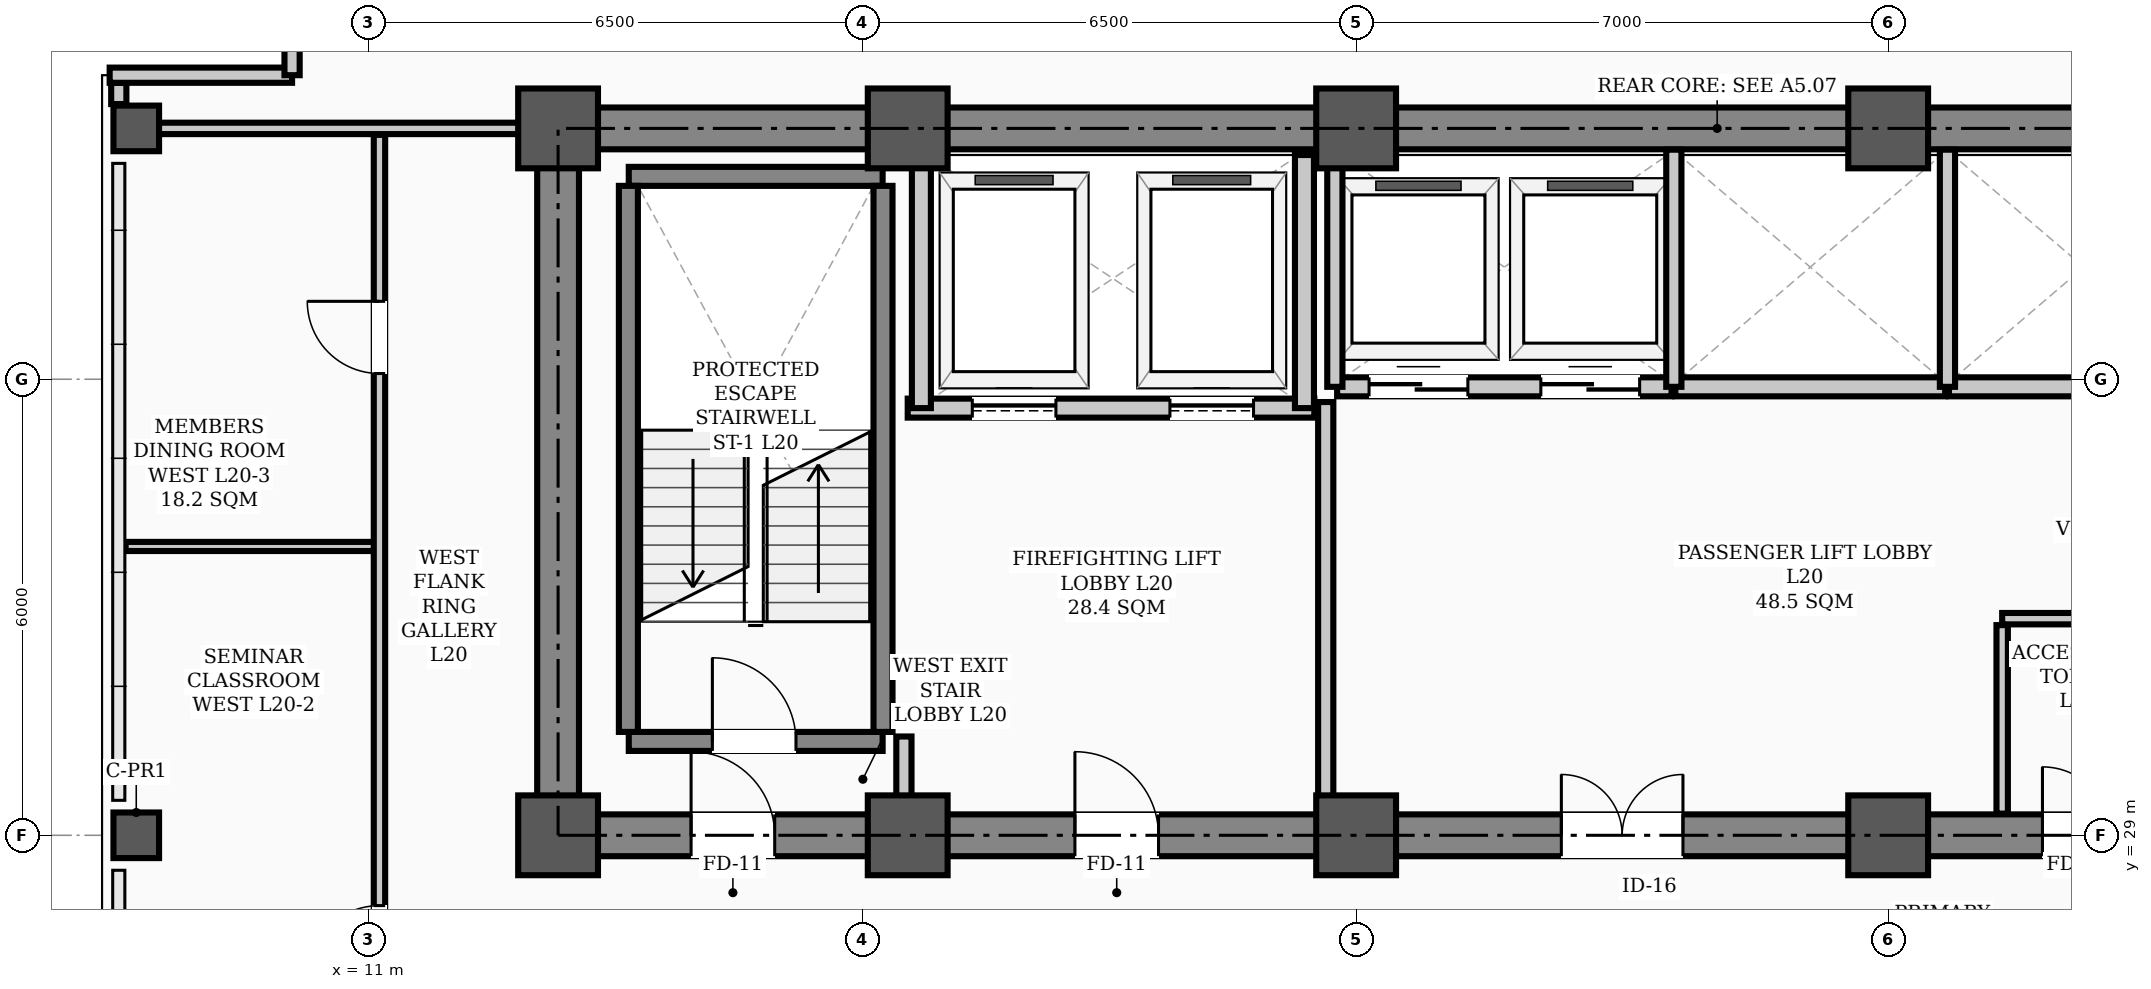
"""IFC4 building model, lengths in metres.
Left out: names, types, materials, properties, quantities, classifications, styles, units other than length and angle.
Written with IfcOpenShell. Run it as: python <this file> out.ifc"""

import sys

from ifc_helpers import new_model, si_unit, direction, frame, frame_2d, origin, origin_2d, place, context, subcontext, project, spatial, rectangle, hollow_rectangle, extrude, element, fill, save


model = new_model("IFC4")
c1 = context("Model", 3, precision=1e-05, world=origin(), true_north=direction((0.0, 1.0)))
c2 = subcontext(c1, "Body", "Model", "MODEL_VIEW")
j1 = project(units=[si_unit("LENGTHUNIT", "METRE"), si_unit("PLANEANGLEUNIT", "RADIAN")], contexts=[c1])
p1 = place(None, origin())
s1 = spatial("IfcSite", under=j1, at=p1, CompositionType="ELEMENT")
p2 = place(p1, origin())
s2 = spatial("IfcBuilding", under=s1, at=p2, CompositionType="ELEMENT")
p3 = place(p2, frame((0.0, 0.0, 81.1)))
s3 = spatial("IfcBuildingStorey", under=s2, at=p3, CompositionType="ELEMENT", Elevation=81.1)
for number, where, z_axis, x_axis in (
    (1, (13.5, 29.0, 0.0), (0.0, 0.0, 1.0), (1.0, 0.0, 0.0)),
    (2, (13.5, 38.3, 0.0), (0.0, 0.0, 1.0), (1.0, 0.0, 0.0)),
    (3, (18.1, 29.0, 0.0), (0.0, 0.0, 1.0), (1.0, 0.0, 0.0)),
    (4, (18.1, 38.3, 0.0), (0.0, 0.0, 1.0), (1.0, 0.0, 0.0)),
    (5, (24.0, 29.0, 0.0), (0.0, 0.0, 1.0), (1.0, 0.0, 0.0)),
    (6, (24.0, 38.3, 0.0), (0.0, 0.0, 1.0), (1.0, 0.0, 0.0)),
    (7, (31.0, 29.0, 0.0), (0.0, 0.0, 1.0), (1.0, 0.0, 0.0)),
    (8, (31.0, 38.3, 0.0), (0.0, 0.0, 1.0), (1.0, 0.0, 0.0)),
):
    element("IfcColumn", number, at=place(p3, frame(where, z_axis=z_axis, x_axis=x_axis)), inside=s3, PredefinedType="COLUMN", context=c2, shape_type="SweptSolid", body=[
        extrude(hollow_rectangle(XDim=1.05, YDim=1.05, WallThickness=0.038, InnerFilletRadius=0.019, OuterFilletRadius=0.057, at=origin_2d()), origin(), (0.0, 0.0, 1.0), 3.9),
    ])
for number, where, z_axis, x_axis in (
    (9, (7.95, 29.0, 0.0), (0.0, 0.0, 1.0), (1.0, 0.0, 0.0)),
    (10, (7.95, 38.3, 0.0), (0.0, 0.0, 1.0), (1.0, 0.0, 0.0)),
):
    element("IfcColumn", number, at=place(p3, frame(where, z_axis=z_axis, x_axis=x_axis)), inside=s3, PredefinedType="COLUMN", context=c2, shape_type="SweptSolid", body=[
        extrude(hollow_rectangle(XDim=0.6, YDim=0.6, WallThickness=0.026, InnerFilletRadius=0.013, OuterFilletRadius=0.039, at=origin_2d()), origin(), (0.0, 0.0, 1.0), 3.9),
    ])
p4 = place(p3, frame((7.72, 38.62, 0.0), z_axis=(0.0, 0.0, 1.0), x_axis=(0.0, 1.0, 0.0)))
e11 = element("IfcWall", 11, at=p4, inside=s3, PredefinedType="PARAPET", context=c2, shape_type="SweptSolid", body=[
    extrude(rectangle(XDim=0.28, YDim=0.2, at=frame_2d((0.14, 0.0))), origin(), (0.0, 0.0, 1.0), 1.2),
])
for number, where, z_axis, x_axis in (
    (12, (7.6, 39.0, 0.0), (0.0, 0.0, 1.0), (1.0, 0.0, 0.0)),
    (13, (10.0, 39.0, 0.0), (0.0, 0.0, 1.0), (0.0, 1.0, 0.0)),
):
    element("IfcWall", number, at=place(p3, frame(where, z_axis=z_axis, x_axis=x_axis)), inside=s3, PredefinedType="PARAPET", context=c2, shape_type="SweptSolid", body=[
        extrude(rectangle(XDim=2.4, YDim=0.2, at=frame_2d((1.2, 0.0))), origin(), (0.0, 0.0, 1.0), 1.2),
    ])
p5 = place(p3, frame((13.5, 29.0, 0.0), z_axis=(0.0, 0.0, 1.0), x_axis=(1.0, 0.0, 0.0)))
e14 = element("IfcWall", 14, at=p5, inside=s3, PredefinedType="SHEAR", context=c2, shape_type="SweptSolid", body=[
    extrude(rectangle(XDim=30.5, YDim=0.55, at=frame_2d((15.25, 0.0))), origin(), (0.0, 0.0, 1.0), 3.72),
])
p6 = place(p5, frame((1.75, 0.0, 0.0)))
e15 = element("IfcOpeningElement", 15, at=p6, cuts=e14, PredefinedType="OPENING", context=c2, shape_type="SweptSolid", body=[
    extrude(rectangle(XDim=1.1, YDim=2.08, at=frame_2d((0.55, 1.04))), frame((0.0, 0.285, 0.0), z_axis=(0.0, -1.0, 0.0), x_axis=(1.0, 0.0, 0.0)), (0.0, 0.0, 1.0), 0.57),
])
p7 = place(p5, frame((26.7, 0.0, 0.0)))
e16 = element("IfcOpeningElement", 16, at=p7, cuts=e14, PredefinedType="OPENING", context=c2, shape_type="SweptSolid", body=[
    extrude(rectangle(XDim=1.1, YDim=2.08, at=frame_2d((0.55, 1.04))), frame((0.0, 0.285, 0.0), z_axis=(0.0, -1.0, 0.0), x_axis=(1.0, 0.0, 0.0)), (0.0, 0.0, 1.0), 0.57),
])
p8 = place(p5, frame((6.8, 0.0, 0.0)))
e17 = element("IfcOpeningElement", 17, at=p8, cuts=e14, PredefinedType="OPENING", context=c2, shape_type="SweptSolid", body=[
    extrude(rectangle(XDim=1.1, YDim=2.08, at=frame_2d((0.55, 1.04))), frame((0.0, 0.285, 0.0), z_axis=(0.0, -1.0, 0.0), x_axis=(1.0, 0.0, 0.0)), (0.0, 0.0, 1.0), 0.57),
])
p9 = place(p5, frame((13.2, 0.0, 0.0)))
e18 = element("IfcOpeningElement", 18, at=p9, cuts=e14, PredefinedType="OPENING", context=c2, shape_type="SweptSolid", body=[
    extrude(rectangle(XDim=1.6, YDim=2.08, at=frame_2d((0.8, 1.04))), frame((0.0, 0.285, 0.0), z_axis=(0.0, -1.0, 0.0), x_axis=(1.0, 0.0, 0.0)), (0.0, 0.0, 1.0), 0.57),
])
p10 = place(p5, frame((19.53, 0.0, 0.0)))
e19 = element("IfcOpeningElement", 19, at=p10, cuts=e14, PredefinedType="OPENING", context=c2, shape_type="SweptSolid", body=[
    extrude(rectangle(XDim=0.9, YDim=2.08, at=frame_2d((0.45, 1.04))), frame((0.0, 0.285, 0.0), z_axis=(0.0, -1.0, 0.0), x_axis=(1.0, 0.0, 0.0)), (0.0, 0.0, 1.0), 0.57),
])
p11 = place(p5, frame((21.57, 0.0, 0.0)))
e20 = element("IfcOpeningElement", 20, at=p11, cuts=e14, PredefinedType="OPENING", context=c2, shape_type="SweptSolid", body=[
    extrude(rectangle(XDim=0.9, YDim=2.08, at=frame_2d((0.45, 1.04))), frame((0.0, 0.285, 0.0), z_axis=(0.0, -1.0, 0.0), x_axis=(1.0, 0.0, 0.0)), (0.0, 0.0, 1.0), 0.57),
])
p12 = place(p3, frame((13.5, 38.3, 0.0), z_axis=(0.0, 0.0, 1.0), x_axis=(1.0, 0.0, 0.0)))
e21 = element("IfcWall", 21, at=p12, inside=s3, PredefinedType="SHEAR", context=c2, shape_type="SweptSolid", body=[
    extrude(rectangle(XDim=30.5, YDim=0.55, at=frame_2d((15.25, 0.0))), origin(), (0.0, 0.0, 1.0), 3.72),
])
p13 = place(p3, frame((13.5, 29.35, 0.0), z_axis=(0.0, 0.0, 1.0), x_axis=(0.0, 1.0, 0.0)))
e22 = element("IfcWall", 22, at=p13, inside=s3, PredefinedType="SHEAR", context=c2, shape_type="SweptSolid", body=[
    extrude(rectangle(XDim=8.6, YDim=0.55, at=frame_2d((4.3, 0.0))), origin(), (0.0, 0.0, 1.0), 3.72),
])
p14 = place(p3, frame((14.43, 30.235, 0.0), z_axis=(0.0, 0.0, 1.0), x_axis=(1.0, 0.0, 0.0)))
e23 = element("IfcWall", 23, at=p14, inside=s3, PredefinedType="STANDARD", context=c2, shape_type="SweptSolid", body=[
    extrude(rectangle(XDim=3.34, YDim=0.25, at=frame_2d((1.67, 0.0))), origin(), (0.0, 0.0, 1.0), 3.72),
])
p15 = place(p14, frame((1.1, 0.0, 0.0)))
e24 = element("IfcOpeningElement", 24, at=p15, cuts=e23, PredefinedType="OPENING", context=c2, shape_type="SweptSolid", body=[
    extrude(rectangle(XDim=1.1, YDim=2.08, at=frame_2d((0.55, 1.04))), frame((0.0, 0.135, 0.0), z_axis=(0.0, -1.0, 0.0), x_axis=(1.0, 0.0, 0.0)), (0.0, 0.0, 1.0), 0.27),
])
p16 = place(p3, frame((14.43, 37.669, 0.0), z_axis=(0.0, 0.0, 1.0), x_axis=(1.0, 0.0, 0.0)))
e25 = element("IfcWall", 25, at=p16, inside=s3, PredefinedType="STANDARD", context=c2, shape_type="SweptSolid", body=[
    extrude(rectangle(XDim=3.34, YDim=0.25, at=frame_2d((1.67, 0.0))), origin(), (0.0, 0.0, 1.0), 3.72),
])
for number, where, z_axis, x_axis in (
    (26, (14.425, 30.36, 0.0), (0.0, 0.0, 1.0), (0.0, 1.0, 0.0)),
    (27, (17.775, 30.36, 0.0), (0.0, 0.0, 1.0), (0.0, 1.0, 0.0)),
):
    element("IfcWall", number, at=place(p3, frame(where, z_axis=z_axis, x_axis=x_axis)), inside=s3, PredefinedType="STANDARD", context=c2, shape_type="SweptSolid", body=[
        extrude(rectangle(XDim=7.184, YDim=0.25, at=frame_2d((3.592, 0.0))), origin(), (0.0, 0.0, 1.0), 3.72),
    ])
p17 = place(p3, frame((18.1, 34.62, 0.0), z_axis=(0.0, 0.0, 1.0), x_axis=(1.0, 0.0, 0.0)))
e28 = element("IfcWall", 28, at=p17, inside=s3, PredefinedType="STANDARD", context=c2, shape_type="SweptSolid", body=[
    extrude(rectangle(XDim=5.35, YDim=0.25, at=frame_2d((2.675, 0.0))), origin(), (0.0, 0.0, 1.0), 3.72),
])
p18 = place(p17, frame((0.85, 0.0, 0.0)))
e29 = element("IfcOpeningElement", 29, at=p18, cuts=e28, PredefinedType="OPENING", context=c2, shape_type="SweptSolid", body=[
    extrude(rectangle(XDim=1.1, YDim=2.08, at=frame_2d((0.55, 1.04))), frame((0.0, 0.135, 0.0), z_axis=(0.0, -1.0, 0.0), x_axis=(1.0, 0.0, 0.0)), (0.0, 0.0, 1.0), 0.27),
])
p19 = place(p17, frame((3.45, 0.0, 0.0)))
e30 = element("IfcOpeningElement", 30, at=p19, cuts=e28, PredefinedType="OPENING", context=c2, shape_type="SweptSolid", body=[
    extrude(rectangle(XDim=1.1, YDim=2.08, at=frame_2d((0.55, 1.04))), frame((0.0, 0.135, 0.0), z_axis=(0.0, -1.0, 0.0), x_axis=(1.0, 0.0, 0.0)), (0.0, 0.0, 1.0), 0.27),
])
for number, where, z_axis, x_axis in (
    (31, (18.28, 34.62, 0.0), (0.0, 0.0, 1.0), (0.0, 1.0, 0.0)),
    (32, (23.32, 34.62, 0.0), (0.0, 0.0, 1.0), (0.0, 1.0, 0.0)),
):
    element("IfcWall", number, at=place(p3, frame(where, z_axis=z_axis, x_axis=x_axis)), inside=s3, PredefinedType="STANDARD", context=c2, shape_type="SweptSolid", body=[
        extrude(rectangle(XDim=3.33, YDim=0.25, at=frame_2d((1.665, 0.0))), origin(), (0.0, 0.0, 1.0), 3.3),
    ])
p20 = place(p3, frame((23.75, 34.9, 0.0), z_axis=(0.0, 0.0, 1.0), x_axis=(1.0, 0.0, 0.0)))
e33 = element("IfcWall", 33, at=p20, inside=s3, PredefinedType="STANDARD", context=c2, shape_type="SweptSolid", body=[
    extrude(rectangle(XDim=4.4, YDim=0.25, at=frame_2d((2.2, 0.0))), origin(), (0.0, 0.0, 1.0), 3.72),
])
p21 = place(p20, frame((0.42, 0.0, 0.0)))
e34 = element("IfcOpeningElement", 34, at=p21, cuts=e33, PredefinedType="OPENING", context=c2, shape_type="SweptSolid", body=[
    extrude(rectangle(XDim=1.3, YDim=2.08, at=frame_2d((0.65, 1.04))), frame((0.0, 0.135, 0.0), z_axis=(0.0, -1.0, 0.0), x_axis=(1.0, 0.0, 0.0)), (0.0, 0.0, 1.0), 0.27),
])
p22 = place(p20, frame((2.68, 0.0, 0.0)))
e35 = element("IfcOpeningElement", 35, at=p22, cuts=e33, PredefinedType="OPENING", context=c2, shape_type="SweptSolid", body=[
    extrude(rectangle(XDim=1.3, YDim=2.08, at=frame_2d((0.65, 1.04))), frame((0.0, 0.135, 0.0), z_axis=(0.0, -1.0, 0.0), x_axis=(1.0, 0.0, 0.0)), (0.0, 0.0, 1.0), 0.27),
])
p23 = place(p3, frame((28.2, 34.9, 0.0), z_axis=(0.0, 0.0, 1.0), x_axis=(1.0, 0.0, 0.0)))
e36 = element("IfcWall", 36, at=p23, inside=s3, PredefinedType="STANDARD", context=c2, shape_type="SweptSolid", body=[
    extrude(rectangle(XDim=3.55, YDim=0.25, at=frame_2d((1.775, 0.0))), origin(), (0.0, 0.0, 1.0), 3.72),
])
p24 = place(p3, frame((31.8, 34.9, 0.0), z_axis=(0.0, 0.0, 1.0), x_axis=(1.0, 0.0, 0.0)))
e37 = element("IfcWall", 37, at=p24, inside=s3, PredefinedType="STANDARD", context=c2, shape_type="SweptSolid", body=[
    extrude(rectangle(XDim=3.6, YDim=0.25, at=frame_2d((1.8, 0.0))), origin(), (0.0, 0.0, 1.0), 3.72),
])
p25 = place(p3, frame((32.5, 31.85, 0.0), z_axis=(0.0, 0.0, 1.0), x_axis=(1.0, 0.0, 0.0)))
e38 = element("IfcWall", 38, at=p25, inside=s3, PredefinedType="PARTITIONING", context=c2, shape_type="SweptSolid", body=[
    extrude(rectangle(XDim=4.1, YDim=0.15, at=frame_2d((2.05, 0.0))), origin(), (0.0, 0.0, 1.0), 3.72),
])
p26 = place(p3, frame((7.81, 38.3, 0.0), z_axis=(0.0, 0.0, 1.0), x_axis=(1.0, 0.0, 0.0)))
e39 = element("IfcWall", 39, at=p26, inside=s3, PredefinedType="PARTITIONING", context=c2, shape_type="SweptSolid", body=[
    extrude(rectangle(XDim=5.69, YDim=0.15, at=frame_2d((2.845, 0.0))), origin(), (0.0, 0.0, 1.0), 3.0),
])
p27 = place(p3, frame((7.81, 32.8, 0.0), z_axis=(0.0, 0.0, 1.0), x_axis=(1.0, 0.0, 0.0)))
e40 = element("IfcWall", 40, at=p27, inside=s3, PredefinedType="PARTITIONING", context=c2, shape_type="SweptSolid", body=[
    extrude(rectangle(XDim=3.34, YDim=0.12, at=frame_2d((1.67, 0.0))), origin(), (0.0, 0.0, 1.0), 3.212),
])
p28 = place(p3, frame((18.05, 29.285, 0.0), z_axis=(0.0, 0.0, 1.0), x_axis=(0.0, 1.0, 0.0)))
e41 = element("IfcWall", 41, at=p28, inside=s3, PredefinedType="STANDARD", context=c2, shape_type="SweptSolid", body=[
    extrude(rectangle(XDim=1.015, YDim=0.2, at=frame_2d((0.508, 0.0))), origin(), (0.0, 0.0, 1.0), 3.3),
])
p29 = place(p3, frame((23.6, 29.285, 0.0), z_axis=(0.0, 0.0, 1.0), x_axis=(0.0, 1.0, 0.0)))
e42 = element("IfcWall", 42, at=p29, inside=s3, PredefinedType="STANDARD", context=c2, shape_type="SweptSolid", body=[
    extrude(rectangle(XDim=5.415, YDim=0.2, at=frame_2d((2.708, 0.0))), origin(), (0.0, 0.0, 1.0), 3.1),
])
p30 = place(p3, frame((32.5, 29.285, 0.0), z_axis=(0.0, 0.0, 1.0), x_axis=(0.0, 1.0, 0.0)))
e43 = element("IfcWall", 43, at=p30, inside=s3, PredefinedType="PARTITIONING", context=c2, shape_type="SweptSolid", body=[
    extrude(rectangle(XDim=2.48, YDim=0.15, at=frame_2d((1.24, 0.0))), origin(), (0.0, 0.0, 1.0), 3.3),
])
p31 = place(p3, frame((11.15, 17.635, 0.0), z_axis=(0.0, 0.0, 1.0), x_axis=(0.0, 1.0, 0.0)))
e44 = element("IfcWall", 44, at=p31, inside=s3, PredefinedType="PARTITIONING", context=c2, shape_type="SweptSolid", body=[
    extrude(rectangle(XDim=20.58, YDim=0.15, at=frame_2d((10.29, 0.0))), origin(), (0.0, 0.0, 1.0), 3.0),
])
p32 = place(p31, frame((3.865, 0.0, 0.0)))
e45 = element("IfcOpeningElement", 45, at=p32, cuts=e44, PredefinedType="OPENING", context=c2, shape_type="SweptSolid", body=[
    extrude(rectangle(XDim=0.95, YDim=2.08, at=frame_2d((0.475, 1.04))), frame((0.0, 0.085, 0.0), z_axis=(0.0, -1.0, 0.0), x_axis=(1.0, 0.0, 0.0)), (0.0, 0.0, 1.0), 0.17),
])
p33 = place(p31, frame((9.49, 0.0, 0.0)))
e46 = element("IfcOpeningElement", 46, at=p33, cuts=e44, PredefinedType="OPENING", context=c2, shape_type="SweptSolid", body=[
    extrude(rectangle(XDim=0.95, YDim=2.08, at=frame_2d((0.475, 1.04))), frame((0.0, 0.085, 0.0), z_axis=(0.0, -1.0, 0.0), x_axis=(1.0, 0.0, 0.0)), (0.0, 0.0, 1.0), 0.17),
])
p34 = place(p31, frame((17.44, 0.0, 0.0)))
e47 = element("IfcOpeningElement", 47, at=p34, cuts=e44, PredefinedType="OPENING", context=c2, shape_type="SweptSolid", body=[
    extrude(rectangle(XDim=0.95, YDim=2.08, at=frame_2d((0.475, 1.04))), frame((0.0, 0.085, 0.0), z_axis=(0.0, -1.0, 0.0), x_axis=(1.0, 0.0, 0.0)), (0.0, 0.0, 1.0), 0.17),
])
p35 = place(p3, frame((23.72, 34.9, 0.0), z_axis=(0.0, 0.0, 1.0), x_axis=(0.0, 1.0, 0.0)))
e48 = element("IfcWall", 48, at=p35, inside=s3, PredefinedType="STANDARD", context=c2, shape_type="SweptSolid", body=[
    extrude(rectangle(XDim=3.12, YDim=0.2, at=frame_2d((1.56, 0.0))), origin(), (0.0, 0.0, 1.0), 3.1),
])
for number, where, z_axis, x_axis in (
    (49, (28.18, 34.9, 0.0), (0.0, 0.0, 1.0), (0.0, 1.0, 0.0)),
    (50, (31.78, 34.9, 0.0), (0.0, 0.0, 1.0), (0.0, 1.0, 0.0)),
):
    element("IfcWall", number, at=place(p3, frame(where, z_axis=z_axis, x_axis=x_axis)), inside=s3, PredefinedType="STANDARD", context=c2, shape_type="SweptSolid", body=[
        extrude(rectangle(XDim=3.12, YDim=0.2, at=frame_2d((1.56, 0.0))), origin(), (0.0, 0.0, 1.0), 3.3),
    ])
p36 = place(p15, origin())
e51 = element("IfcDoor", 51, at=p36, inside=s3, OperationType="SINGLE_SWING_LEFT", PredefinedType="DOOR", context=c2, shape_type="SweptSolid", body=[
    extrude(rectangle(XDim=1.1, YDim=2.08, at=frame_2d((0.55, 1.04))), frame((0.0, 0.025, 0.0), z_axis=(0.0, -1.0, 0.0), x_axis=(1.0, 0.0, 0.0)), (0.0, 0.0, 1.0), 0.05),
])
fill(e24, e51)
p37 = place(p6, origin())
e52 = element("IfcDoor", 52, at=p37, inside=s3, OperationType="SINGLE_SWING_LEFT", PredefinedType="DOOR", context=c2, shape_type="SweptSolid", body=[
    extrude(rectangle(XDim=1.1, YDim=2.08, at=frame_2d((0.55, 1.04))), frame((0.0, 0.025, 0.0), z_axis=(0.0, -1.0, 0.0), x_axis=(1.0, 0.0, 0.0)), (0.0, 0.0, 1.0), 0.05),
])
fill(e15, e52)
p38 = place(p8, origin())
e53 = element("IfcDoor", 53, at=p38, inside=s3, OperationType="SINGLE_SWING_LEFT", PredefinedType="DOOR", context=c2, shape_type="SweptSolid", body=[
    extrude(rectangle(XDim=1.1, YDim=2.08, at=frame_2d((0.55, 1.04))), frame((0.0, 0.025, 0.0), z_axis=(0.0, -1.0, 0.0), x_axis=(1.0, 0.0, 0.0)), (0.0, 0.0, 1.0), 0.05),
])
fill(e17, e53)
p39 = place(p9, origin())
e54 = element("IfcDoor", 54, at=p39, inside=s3, OperationType="DOUBLE_DOOR_SINGLE_SWING", PredefinedType="DOOR", context=c2, shape_type="SweptSolid", body=[
    extrude(rectangle(XDim=1.6, YDim=2.08, at=frame_2d((0.8, 1.04))), frame((0.0, 0.025, 0.0), z_axis=(0.0, -1.0, 0.0), x_axis=(1.0, 0.0, 0.0)), (0.0, 0.0, 1.0), 0.05),
])
fill(e18, e54)
p40 = place(p10, origin())
e55 = element("IfcDoor", 55, at=p40, inside=s3, OperationType="SINGLE_SWING_LEFT", PredefinedType="DOOR", context=c2, shape_type="SweptSolid", body=[
    extrude(rectangle(XDim=0.9, YDim=2.08, at=frame_2d((0.45, 1.04))), frame((0.0, 0.025, 0.0), z_axis=(0.0, -1.0, 0.0), x_axis=(1.0, 0.0, 0.0)), (0.0, 0.0, 1.0), 0.05),
])
fill(e19, e55)
p41 = place(p33, origin())
e56 = element("IfcDoor", 56, at=p41, inside=s3, OperationType="SINGLE_SWING_LEFT", PredefinedType="DOOR", context=c2, shape_type="SweptSolid", body=[
    extrude(rectangle(XDim=0.95, YDim=2.08, at=frame_2d((0.475, 1.04))), frame((0.0, 0.025, 0.0), z_axis=(0.0, -1.0, 0.0), x_axis=(1.0, 0.0, 0.0)), (0.0, 0.0, 1.0), 0.05),
])
fill(e46, e56)
p42 = place(p34, origin())
e57 = element("IfcDoor", 57, at=p42, inside=s3, OperationType="SINGLE_SWING_RIGHT", PredefinedType="DOOR", context=c2, shape_type="SweptSolid", body=[
    extrude(rectangle(XDim=0.95, YDim=2.08, at=frame_2d((0.475, 1.04))), frame((0.0, 0.025, 0.0), z_axis=(0.0, -1.0, 0.0), x_axis=(1.0, 0.0, 0.0)), (0.0, 0.0, 1.0), 0.05),
])
fill(e47, e57)
p43 = place(p18, origin())
e58 = element("IfcDoor", 58, at=p43, inside=s3, OperationType="SLIDING_TO_LEFT", PredefinedType="DOOR", context=c2, shape_type="SweptSolid", body=[
    extrude(rectangle(XDim=1.1, YDim=2.08, at=frame_2d((0.55, 1.04))), frame((0.0, 0.025, 0.0), z_axis=(0.0, -1.0, 0.0), x_axis=(1.0, 0.0, 0.0)), (0.0, 0.0, 1.0), 0.05),
])
fill(e29, e58)
p44 = place(p19, origin())
e59 = element("IfcDoor", 59, at=p44, inside=s3, OperationType="SLIDING_TO_LEFT", PredefinedType="DOOR", context=c2, shape_type="SweptSolid", body=[
    extrude(rectangle(XDim=1.1, YDim=2.08, at=frame_2d((0.55, 1.04))), frame((0.0, 0.025, 0.0), z_axis=(0.0, -1.0, 0.0), x_axis=(1.0, 0.0, 0.0)), (0.0, 0.0, 1.0), 0.05),
])
fill(e30, e59)
p45 = place(p21, origin())
e60 = element("IfcDoor", 60, at=p45, inside=s3, OperationType="DOUBLE_DOOR_SLIDING", PredefinedType="DOOR", context=c2, shape_type="SweptSolid", body=[
    extrude(rectangle(XDim=1.3, YDim=2.08, at=frame_2d((0.65, 1.04))), frame((0.0, 0.025, 0.0), z_axis=(0.0, -1.0, 0.0), x_axis=(1.0, 0.0, 0.0)), (0.0, 0.0, 1.0), 0.05),
])
fill(e34, e60)
p46 = place(p22, origin())
e61 = element("IfcDoor", 61, at=p46, inside=s3, OperationType="DOUBLE_DOOR_SLIDING", PredefinedType="DOOR", context=c2, shape_type="SweptSolid", body=[
    extrude(rectangle(XDim=1.3, YDim=2.08, at=frame_2d((0.65, 1.04))), frame((0.0, 0.025, 0.0), z_axis=(0.0, -1.0, 0.0), x_axis=(1.0, 0.0, 0.0)), (0.0, 0.0, 1.0), 0.05),
])
fill(e35, e61)
save(model, sys.argv[1])
